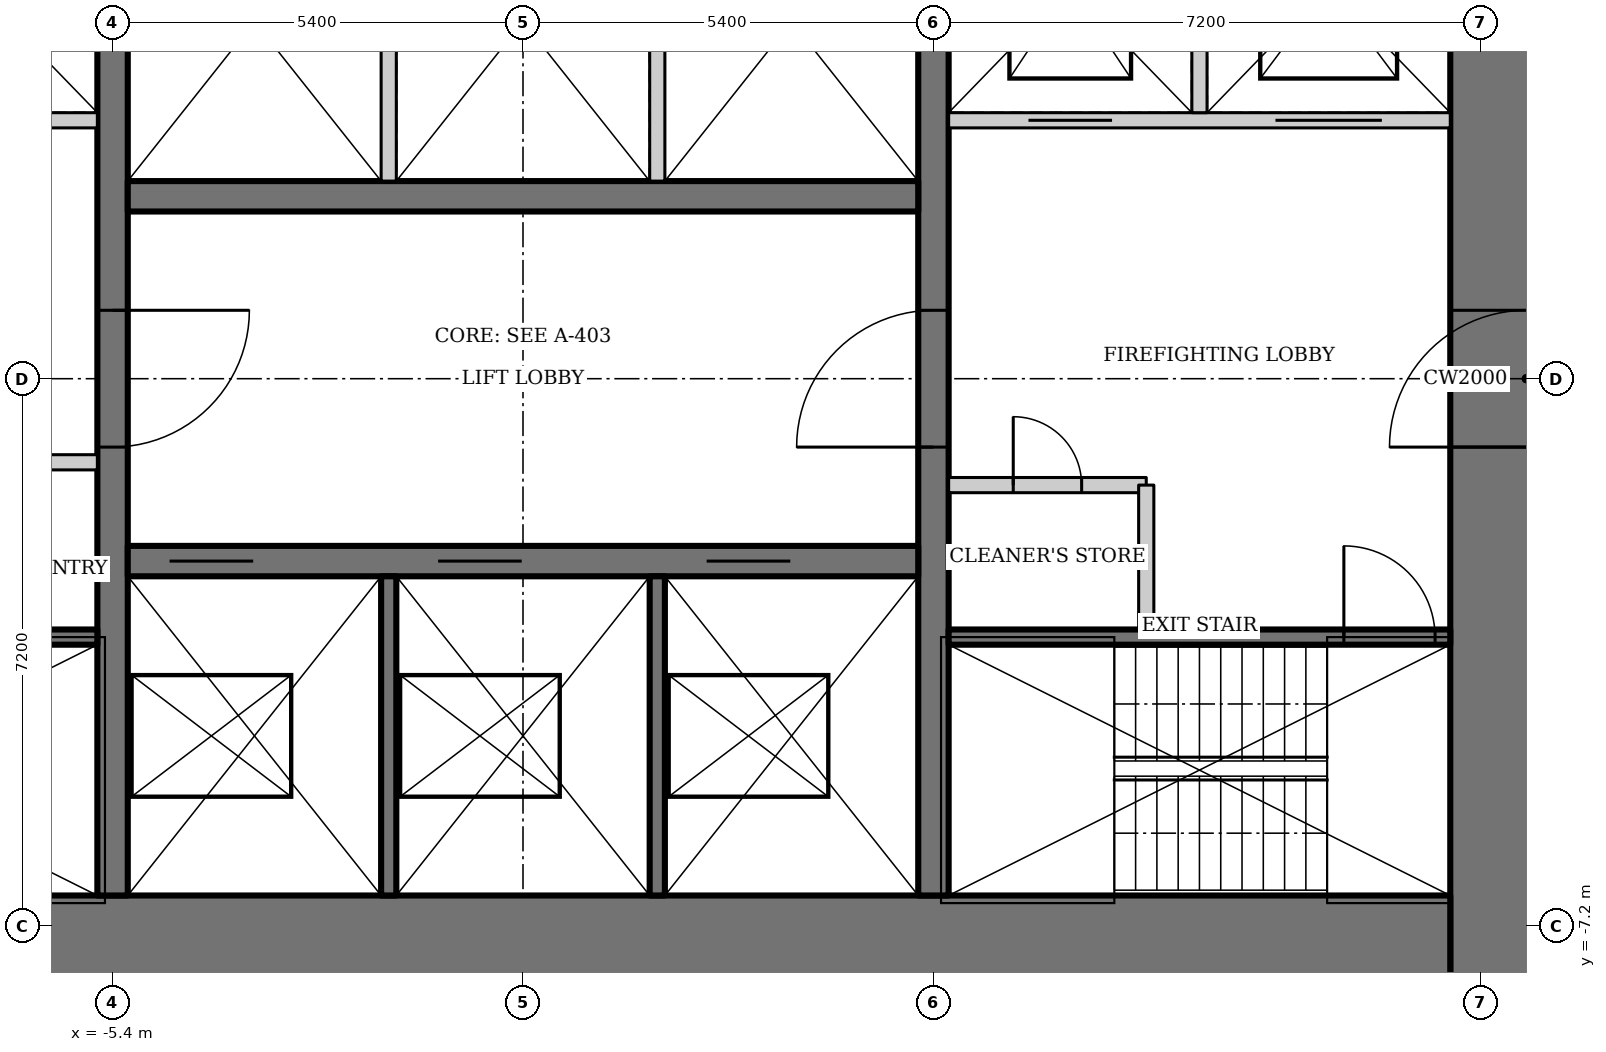
"""IFC4 building model, lengths in metres.
Left out: names, types, materials, properties, quantities, classifications, styles, units other than length and angle.
Written with IfcOpenShell. Run it as: python <this file> out.ifc"""

import sys

from ifc_helpers import new_model, si_unit, direction, frame, frame_2d, origin, place, context, subcontext, project, spatial, rectangle, extrude, element, fill, save


model = new_model("IFC4")
c1 = context("Model", 3, precision=1e-05, world=origin(), true_north=direction((0.0, 1.0)))
c2 = subcontext(c1, "Body", "Model", "MODEL_VIEW")
j1 = project(units=[si_unit("LENGTHUNIT", "METRE"), si_unit("PLANEANGLEUNIT", "RADIAN")], contexts=[c1])
p1 = place(None, origin())
s1 = spatial("IfcSite", under=j1, at=p1, CompositionType="ELEMENT")
p2 = place(p1, origin())
s2 = spatial("IfcBuilding", under=s1, at=p2, CompositionType="ELEMENT")
p3 = place(p2, frame((0.0, 0.0, 51.4)))
s3 = spatial("IfcBuildingStorey", under=s2, at=p3, CompositionType="ELEMENT", Elevation=51.4)
p4 = place(p3, frame((13.2, -13.0, 0.0), z_axis=(0.0, 0.0, 1.0), x_axis=(0.0, 1.0, 0.0)))
e1 = element("IfcWall", 1, at=p4, inside=s3, PredefinedType="SHEAR", context=c2, shape_type="SweptSolid", body=[
    extrude(rectangle(XDim=26.0, YDim=2.0, at=frame_2d((13.0, 0.0))), origin(), (0.0, 0.0, 1.0), 3.6),
])
p5 = place(p4, frame((12.1, 0.0, 0.0)))
e2 = element("IfcOpeningElement", 2, at=p5, cuts=e1, PredefinedType="OPENING", context=c2, shape_type="SweptSolid", body=[
    extrude(rectangle(XDim=1.8, YDim=2.1, at=frame_2d((0.9, 1.05))), frame((0.0, 1.01, 0.0), z_axis=(0.0, -1.0, 0.0), x_axis=(1.0, 0.0, 0.0)), (0.0, 0.0, 1.0), 2.02),
])
p6 = place(p3, frame((-12.2, -8.0, 0.0), z_axis=(0.0, 0.0, 1.0), x_axis=(1.0, 0.0, 0.0)))
e3 = element("IfcWall", 3, at=p6, inside=s3, PredefinedType="SHEAR", context=c2, shape_type="SweptSolid", body=[
    extrude(rectangle(XDim=24.4, YDim=2.4, at=frame_2d((12.2, 0.0))), origin(), (0.0, 0.0, 1.0), 3.6),
])
p7 = place(p3, frame((5.4, -6.8, 0.0), z_axis=(0.0, 0.0, 1.0), x_axis=(0.0, 1.0, 0.0)))
e4 = element("IfcWall", 4, at=p7, inside=s3, PredefinedType="SHEAR", context=c2, shape_type="SweptSolid", body=[
    extrude(rectangle(XDim=13.6, YDim=0.4, at=frame_2d((6.8, 0.0))), origin(), (0.0, 0.0, 1.0), 3.6),
])
p8 = place(p7, frame((5.9, 0.0, 0.0)))
e5 = element("IfcOpeningElement", 5, at=p8, cuts=e4, PredefinedType="OPENING", context=c2, shape_type="SweptSolid", body=[
    extrude(rectangle(XDim=1.8, YDim=2.1, at=frame_2d((0.9, 1.05))), frame((0.0, 0.21, 0.0), z_axis=(0.0, -1.0, 0.0), x_axis=(1.0, 0.0, 0.0)), (0.0, 0.0, 1.0), 0.42),
])
p9 = place(p3, frame((-5.4, 6.8, 0.0), z_axis=(0.0, 0.0, 1.0), x_axis=(0.0, -1.0, 0.0)))
e6 = element("IfcWall", 6, at=p9, inside=s3, PredefinedType="SHEAR", context=c2, shape_type="SweptSolid", body=[
    extrude(rectangle(XDim=13.6, YDim=0.4, at=frame_2d((6.8, 0.0))), origin(), (0.0, 0.0, 1.0), 3.6),
])
p10 = place(p9, frame((5.9, 0.0, 0.0)))
e7 = element("IfcOpeningElement", 7, at=p10, cuts=e6, PredefinedType="OPENING", context=c2, shape_type="SweptSolid", body=[
    extrude(rectangle(XDim=1.8, YDim=2.1, at=frame_2d((0.9, 1.05))), frame((0.0, 0.21, 0.0), z_axis=(0.0, -1.0, 0.0), x_axis=(1.0, 0.0, 0.0)), (0.0, 0.0, 1.0), 0.42),
])
p11 = place(p3, frame((-5.2, -2.4, 0.0), z_axis=(0.0, 0.0, 1.0), x_axis=(1.0, 0.0, 0.0)))
e8 = element("IfcWall", 8, at=p11, inside=s3, PredefinedType="SHEAR", context=c2, shape_type="SweptSolid", body=[
    extrude(rectangle(XDim=10.4, YDim=0.4, at=frame_2d((5.2, 0.0))), origin(), (0.0, 0.0, 1.0), 3.6),
])
p12 = place(p11, frame((0.55, 0.0, 0.0)))
e9 = element("IfcOpeningElement", 9, at=p12, cuts=e8, PredefinedType="OPENING", context=c2, shape_type="SweptSolid", body=[
    extrude(rectangle(XDim=1.1, YDim=2.2, at=frame_2d((0.55, 1.1))), frame((0.0, 0.21, 0.0), z_axis=(0.0, -1.0, 0.0), x_axis=(1.0, 0.0, 0.0)), (0.0, 0.0, 1.0), 0.42),
])
p13 = place(p11, frame((4.083, 0.0, 0.0)))
e10 = element("IfcOpeningElement", 10, at=p13, cuts=e8, PredefinedType="OPENING", context=c2, shape_type="SweptSolid", body=[
    extrude(rectangle(XDim=1.1, YDim=2.2, at=frame_2d((0.55, 1.1))), frame((0.0, 0.21, 0.0), z_axis=(0.0, -1.0, 0.0), x_axis=(1.0, 0.0, 0.0)), (0.0, 0.0, 1.0), 0.42),
])
p14 = place(p11, frame((7.617, 0.0, 0.0)))
e11 = element("IfcOpeningElement", 11, at=p14, cuts=e8, PredefinedType="OPENING", context=c2, shape_type="SweptSolid", body=[
    extrude(rectangle(XDim=1.1, YDim=2.2, at=frame_2d((0.55, 1.1))), frame((0.0, 0.21, 0.0), z_axis=(0.0, -1.0, 0.0), x_axis=(1.0, 0.0, 0.0)), (0.0, 0.0, 1.0), 0.42),
])
for number, where, z_axis, x_axis in (
    (12, (-1.767, -2.6, 0.0), (0.0, 0.0, 1.0), (0.0, -1.0, 0.0)),
    (13, (1.767, -2.6, 0.0), (0.0, 0.0, 1.0), (0.0, -1.0, 0.0)),
):
    element("IfcWall", number, at=place(p3, frame(where, z_axis=z_axis, x_axis=x_axis)), inside=s3, PredefinedType="SOLIDWALL", context=c2, shape_type="SweptSolid", body=[
        extrude(rectangle(XDim=4.2, YDim=0.2, at=frame_2d((2.1, 0.0))), origin(), (0.0, 0.0, 1.0), 3.6),
    ])
p15 = place(p3, frame((5.2, 2.4, 0.0), z_axis=(0.0, 0.0, 1.0), x_axis=(-1.0, 0.0, 0.0)))
e14 = element("IfcWall", 14, at=p15, inside=s3, PredefinedType="SHEAR", context=c2, shape_type="SweptSolid", body=[
    extrude(rectangle(XDim=10.4, YDim=0.4, at=frame_2d((5.2, 0.0))), origin(), (0.0, 0.0, 1.0), 3.6),
])
for number, where, z_axis, x_axis in (
    (15, (-1.767, 2.6, 0.0), (0.0, 0.0, 1.0), (0.0, 1.0, 0.0)),
    (16, (1.767, 2.6, 0.0), (0.0, 0.0, 1.0), (0.0, 1.0, 0.0)),
):
    element("IfcWall", number, at=place(p3, frame(where, z_axis=z_axis, x_axis=x_axis)), inside=s3, PredefinedType="SOLIDWALL", context=c2, shape_type="SweptSolid", body=[
        extrude(rectangle(XDim=4.2, YDim=0.2, at=frame_2d((2.1, 0.0))), origin(), (0.0, 0.0, 1.0), 3.6),
    ])
p16 = place(p3, frame((5.6, -3.4, 0.0), z_axis=(0.0, 0.0, 1.0), x_axis=(1.0, 0.0, 0.0)))
e17 = element("IfcWall", 17, at=p16, inside=s3, PredefinedType="SHEAR", context=c2, shape_type="SweptSolid", body=[
    extrude(rectangle(XDim=6.6, YDim=0.2, at=frame_2d((3.3, 0.0))), origin(), (0.0, 0.0, 1.0), 3.6),
])
p17 = place(p16, frame((5.2, 0.0, 0.0)))
e18 = element("IfcOpeningElement", 18, at=p17, cuts=e17, PredefinedType="OPENING", context=c2, shape_type="SweptSolid", body=[
    extrude(rectangle(XDim=1.2, YDim=2.1, at=frame_2d((0.6, 1.05))), frame((0.0, 0.11, 0.0), z_axis=(0.0, -1.0, 0.0), x_axis=(1.0, 0.0, 0.0)), (0.0, 0.0, 1.0), 0.22),
])
p18 = place(p3, frame((12.2, 3.4, 0.0), z_axis=(0.0, 0.0, 1.0), x_axis=(-1.0, 0.0, 0.0)))
e19 = element("IfcWall", 19, at=p18, inside=s3, PredefinedType="SOLIDWALL", context=c2, shape_type="SweptSolid", body=[
    extrude(rectangle(XDim=6.6, YDim=0.2, at=frame_2d((3.3, 0.0))), origin(), (0.0, 0.0, 1.0), 3.6),
])
p19 = place(p18, frame((4.45, 0.0, 0.0)))
e20 = element("IfcOpeningElement", 20, at=p19, cuts=e19, PredefinedType="OPENING", context=c2, shape_type="SweptSolid", body=[
    extrude(rectangle(XDim=1.1, YDim=2.2, at=frame_2d((0.55, 1.1))), frame((0.0, 0.11, 0.0), z_axis=(0.0, -1.0, 0.0), x_axis=(1.0, 0.0, 0.0)), (0.0, 0.0, 1.0), 0.22),
])
p20 = place(p18, frame((0.9, 0.0, 0.0)))
e21 = element("IfcOpeningElement", 21, at=p20, cuts=e19, PredefinedType="OPENING", context=c2, shape_type="SweptSolid", body=[
    extrude(rectangle(XDim=1.4, YDim=2.2, at=frame_2d((0.7, 1.1))), frame((0.0, 0.11, 0.0), z_axis=(0.0, -1.0, 0.0), x_axis=(1.0, 0.0, 0.0)), (0.0, 0.0, 1.0), 0.22),
])
p21 = place(p3, frame((8.9, 3.5, 0.0), z_axis=(0.0, 0.0, 1.0), x_axis=(0.0, 1.0, 0.0)))
e22 = element("IfcWall", 22, at=p21, inside=s3, PredefinedType="SOLIDWALL", context=c2, shape_type="SweptSolid", body=[
    extrude(rectangle(XDim=3.3, YDim=0.2, at=frame_2d((1.65, 0.0))), origin(), (0.0, 0.0, 1.0), 3.6),
])
p22 = place(p3, frame((-5.6, -3.4, 0.0), z_axis=(0.0, 0.0, 1.0), x_axis=(-1.0, 0.0, 0.0)))
e23 = element("IfcWall", 23, at=p22, inside=s3, PredefinedType="SHEAR", context=c2, shape_type="SweptSolid", body=[
    extrude(rectangle(XDim=6.6, YDim=0.2, at=frame_2d((3.3, 0.0))), origin(), (0.0, 0.0, 1.0), 3.6),
])
p23 = place(p22, frame((5.2, 0.0, 0.0)))
e24 = element("IfcOpeningElement", 24, at=p23, cuts=e23, PredefinedType="OPENING", context=c2, shape_type="SweptSolid", body=[
    extrude(rectangle(XDim=1.2, YDim=2.1, at=frame_2d((0.6, 1.05))), frame((0.0, 0.11, 0.0), z_axis=(0.0, -1.0, 0.0), x_axis=(1.0, 0.0, 0.0)), (0.0, 0.0, 1.0), 0.22),
])
p24 = place(p3, frame((-12.2, 3.4, 0.0), z_axis=(0.0, 0.0, 1.0), x_axis=(1.0, 0.0, 0.0)))
e25 = element("IfcWall", 25, at=p24, inside=s3, PredefinedType="SOLIDWALL", context=c2, shape_type="SweptSolid", body=[
    extrude(rectangle(XDim=6.6, YDim=0.2, at=frame_2d((3.3, 0.0))), origin(), (0.0, 0.0, 1.0), 3.6),
])
p25 = place(p24, frame((1.05, 0.0, 0.0)))
e26 = element("IfcOpeningElement", 26, at=p25, cuts=e25, PredefinedType="OPENING", context=c2, shape_type="SweptSolid", body=[
    extrude(rectangle(XDim=1.1, YDim=2.2, at=frame_2d((0.55, 1.1))), frame((0.0, 0.11, 0.0), z_axis=(0.0, -1.0, 0.0), x_axis=(1.0, 0.0, 0.0)), (0.0, 0.0, 1.0), 0.22),
])
p26 = place(p24, frame((4.3, 0.0, 0.0)))
e27 = element("IfcOpeningElement", 27, at=p26, cuts=e25, PredefinedType="OPENING", context=c2, shape_type="SweptSolid", body=[
    extrude(rectangle(XDim=1.4, YDim=2.2, at=frame_2d((0.7, 1.1))), frame((0.0, 0.11, 0.0), z_axis=(0.0, -1.0, 0.0), x_axis=(1.0, 0.0, 0.0)), (0.0, 0.0, 1.0), 0.22),
])
p27 = place(p3, frame((-5.6, -1.1, 0.0), z_axis=(0.0, 0.0, 1.0), x_axis=(-1.0, 0.0, 0.0)))
e28 = element("IfcWall", 28, at=p27, inside=s3, PredefinedType="SOLIDWALL", context=c2, shape_type="SweptSolid", body=[
    extrude(rectangle(XDim=2.4, YDim=0.2, at=frame_2d((1.2, 0.0))), origin(), (0.0, 0.0, 1.0), 3.45),
])
p28 = place(p27, frame((0.75, 0.0, 0.0)))
e29 = element("IfcOpeningElement", 29, at=p28, cuts=e28, PredefinedType="OPENING", context=c2, shape_type="SweptSolid", body=[
    extrude(rectangle(XDim=0.9, YDim=2.1, at=frame_2d((0.45, 1.05))), frame((0.0, 0.11, 0.0), z_axis=(0.0, -1.0, 0.0), x_axis=(1.0, 0.0, 0.0)), (0.0, 0.0, 1.0), 0.22),
])
p29 = place(p3, frame((5.6, -1.4, 0.0), z_axis=(0.0, 0.0, 1.0), x_axis=(1.0, 0.0, 0.0)))
e30 = element("IfcWall", 30, at=p29, inside=s3, PredefinedType="SOLIDWALL", context=c2, shape_type="SweptSolid", body=[
    extrude(rectangle(XDim=2.6, YDim=0.2, at=frame_2d((1.3, 0.0))), origin(), (0.0, 0.0, 1.0), 3.45),
])
p30 = place(p29, frame((0.85, 0.0, 0.0)))
e31 = element("IfcOpeningElement", 31, at=p30, cuts=e30, PredefinedType="OPENING", context=c2, shape_type="SweptSolid", body=[
    extrude(rectangle(XDim=0.9, YDim=2.1, at=frame_2d((0.45, 1.05))), frame((0.0, 0.11, 0.0), z_axis=(0.0, -1.0, 0.0), x_axis=(1.0, 0.0, 0.0)), (0.0, 0.0, 1.0), 0.22),
])
p31 = place(p3, frame((8.2, -1.4, 0.0), z_axis=(0.0, 0.0, 1.0), x_axis=(0.0, -1.0, 0.0)))
e32 = element("IfcWall", 32, at=p31, inside=s3, PredefinedType="SOLIDWALL", context=c2, shape_type="SweptSolid", body=[
    extrude(rectangle(XDim=1.9, YDim=0.2, at=frame_2d((0.95, 0.0))), origin(), (0.0, 0.0, 1.0), 3.45),
])
p32 = place(p30, origin())
e33 = element("IfcDoor", 33, at=p32, inside=s3, OperationType="SINGLE_SWING_LEFT", PredefinedType="DOOR", context=c2, shape_type="SweptSolid", body=[
    extrude(rectangle(XDim=0.9, YDim=2.1, at=frame_2d((0.45, 1.05))), frame((0.0, 0.025, 0.0), z_axis=(0.0, -1.0, 0.0), x_axis=(1.0, 0.0, 0.0)), (0.0, 0.0, 1.0), 0.05),
])
fill(e31, e33)
p33 = place(p8, origin())
e34 = element("IfcDoor", 34, at=p33, inside=s3, OperationType="DOUBLE_DOOR_DOUBLE_SWING", PredefinedType="DOOR", context=c2, shape_type="SweptSolid", body=[
    extrude(rectangle(XDim=1.8, YDim=2.1, at=frame_2d((0.9, 1.05))), frame((0.0, 0.025, 0.0), z_axis=(0.0, -1.0, 0.0), x_axis=(1.0, 0.0, 0.0)), (0.0, 0.0, 1.0), 0.05),
])
fill(e5, e34)
p34 = place(p10, origin())
e35 = element("IfcDoor", 35, at=p34, inside=s3, OperationType="DOUBLE_DOOR_DOUBLE_SWING", PredefinedType="DOOR", context=c2, shape_type="SweptSolid", body=[
    extrude(rectangle(XDim=1.8, YDim=2.1, at=frame_2d((0.9, 1.05))), frame((0.0, 0.025, 0.0), z_axis=(0.0, -1.0, 0.0), x_axis=(1.0, 0.0, 0.0)), (0.0, 0.0, 1.0), 0.05),
])
fill(e7, e35)
p35 = place(p17, origin())
e36 = element("IfcDoor", 36, at=p35, inside=s3, OperationType="SINGLE_SWING_RIGHT", PredefinedType="DOOR", context=c2, shape_type="SweptSolid", body=[
    extrude(rectangle(XDim=1.2, YDim=2.1, at=frame_2d((0.6, 1.05))), frame((0.0, 0.025, 0.0), z_axis=(0.0, -1.0, 0.0), x_axis=(1.0, 0.0, 0.0)), (0.0, 0.0, 1.0), 0.05),
])
fill(e18, e36)
p36 = place(p5, origin())
e37 = element("IfcDoor", 37, at=p36, inside=s3, OperationType="DOUBLE_DOOR_DOUBLE_SWING", PredefinedType="DOOR", context=c2, shape_type="SweptSolid", body=[
    extrude(rectangle(XDim=1.8, YDim=2.1, at=frame_2d((0.9, 1.05))), frame((0.0, 0.025, 0.0), z_axis=(0.0, -1.0, 0.0), x_axis=(1.0, 0.0, 0.0)), (0.0, 0.0, 1.0), 0.05),
])
fill(e2, e37)
p37 = place(p12, origin())
e38 = element("IfcDoor", 38, at=p37, inside=s3, OperationType="DOUBLE_DOOR_SLIDING", PredefinedType="DOOR", context=c2, shape_type="SweptSolid", body=[
    extrude(rectangle(XDim=1.1, YDim=2.2, at=frame_2d((0.55, 1.1))), frame((0.0, 0.025, 0.0), z_axis=(0.0, -1.0, 0.0), x_axis=(1.0, 0.0, 0.0)), (0.0, 0.0, 1.0), 0.05),
])
fill(e9, e38)
p38 = place(p13, origin())
e39 = element("IfcDoor", 39, at=p38, inside=s3, OperationType="DOUBLE_DOOR_SLIDING", PredefinedType="DOOR", context=c2, shape_type="SweptSolid", body=[
    extrude(rectangle(XDim=1.1, YDim=2.2, at=frame_2d((0.55, 1.1))), frame((0.0, 0.025, 0.0), z_axis=(0.0, -1.0, 0.0), x_axis=(1.0, 0.0, 0.0)), (0.0, 0.0, 1.0), 0.05),
])
fill(e10, e39)
p39 = place(p14, origin())
e40 = element("IfcDoor", 40, at=p39, inside=s3, OperationType="DOUBLE_DOOR_SLIDING", PredefinedType="DOOR", context=c2, shape_type="SweptSolid", body=[
    extrude(rectangle(XDim=1.1, YDim=2.2, at=frame_2d((0.55, 1.1))), frame((0.0, 0.025, 0.0), z_axis=(0.0, -1.0, 0.0), x_axis=(1.0, 0.0, 0.0)), (0.0, 0.0, 1.0), 0.05),
])
fill(e11, e40)
p40 = place(p19, origin())
e41 = element("IfcDoor", 41, at=p40, inside=s3, OperationType="DOUBLE_DOOR_SLIDING", PredefinedType="DOOR", context=c2, shape_type="SweptSolid", body=[
    extrude(rectangle(XDim=1.1, YDim=2.2, at=frame_2d((0.55, 1.1))), frame((0.0, 0.025, 0.0), z_axis=(0.0, -1.0, 0.0), x_axis=(1.0, 0.0, 0.0)), (0.0, 0.0, 1.0), 0.05),
])
fill(e20, e41)
p41 = place(p20, origin())
e42 = element("IfcDoor", 42, at=p41, inside=s3, OperationType="DOUBLE_DOOR_SLIDING", PredefinedType="DOOR", context=c2, shape_type="SweptSolid", body=[
    extrude(rectangle(XDim=1.4, YDim=2.2, at=frame_2d((0.7, 1.1))), frame((0.0, 0.025, 0.0), z_axis=(0.0, -1.0, 0.0), x_axis=(1.0, 0.0, 0.0)), (0.0, 0.0, 1.0), 0.05),
])
fill(e21, e42)
save(model, sys.argv[1])
